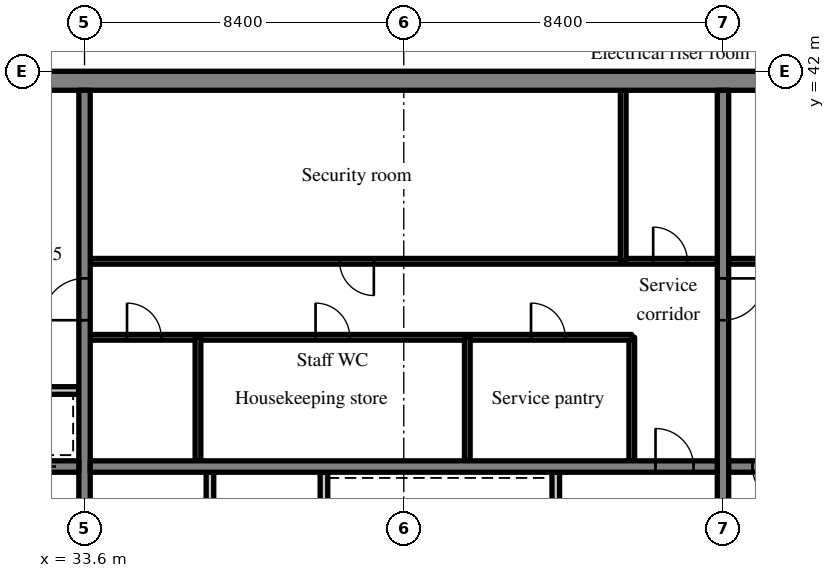
"""IFC4 building model, lengths in metres.
Left out: names, types, materials, properties, quantities, classifications, styles, units other than length and angle.
Written with IfcOpenShell. Run it as: python <this file> out.ifc"""

import sys

from ifc_helpers import new_model, si_unit, direction, frame, frame_2d, origin, place, context, subcontext, project, spatial, rectangle, extrude, source, transform, mapped, element, fill, save


model = new_model("IFC4")
c1 = context("Model", 3, precision=1e-05, world=origin(), true_north=direction((0.0, 1.0)))
c2 = subcontext(c1, "Body", "Model", "MODEL_VIEW")
j1 = project(units=[si_unit("LENGTHUNIT", "METRE"), si_unit("PLANEANGLEUNIT", "RADIAN")], contexts=[c1])
p1 = place(None, origin())
s1 = spatial("IfcSite", under=j1, at=p1, CompositionType="ELEMENT")
p2 = place(p1, origin())
s2 = spatial("IfcBuilding", under=s1, at=p2, CompositionType="ELEMENT")
p3 = place(p2, frame((0.0, 0.0, 313.7)))
s3 = spatial("IfcBuildingStorey", under=s2, at=p3, CompositionType="ELEMENT", Elevation=313.7)
m1 = source(origin(), c2, "Body", "SweptSolid", [
    extrude(rectangle(XDim=50.4, YDim=0.5, at=frame_2d((25.2, 0.0))), origin(), (0.0, 0.0, 1.0), 3.72),
])
p4 = place(p3, frame((25.2, 41.75, 0.0), z_axis=(0.0, 0.0, 1.0), x_axis=(1.0, 0.0, 0.0)))
e1 = element("IfcWall", 1, at=p4, inside=s3, PredefinedType="SHEAR", context=c2, shape_type="MappedRepresentation", body=[
    mapped(m1, transform((0.0, 0.0, 0.0), scale=1.0)),
])
m2 = source(origin(), c2, "Body", "SweptSolid", [
    extrude(rectangle(XDim=19.0, YDim=0.3, at=frame_2d((9.5, 0.0))), origin(), (0.0, 0.0, 1.0), 3.72),
])
p5 = place(p3, frame((33.6, 22.5, 0.0), z_axis=(0.0, 0.0, 1.0), x_axis=(0.0, 1.0, 0.0)))
e2 = element("IfcWall", 2, at=p5, inside=s3, PredefinedType="SHEAR", context=c2, shape_type="MappedRepresentation", body=[
    mapped(m2, transform((0.0, 0.0, 0.0), scale=1.0)),
])
m3 = source(origin(), c2, "Body", "SweptSolid", [
    extrude(rectangle(XDim=1.1, YDim=2.1, at=frame_2d((0.55, 1.05))), frame((0.0, 0.16, 0.0), z_axis=(0.0, -1.0, 0.0), x_axis=(1.0, 0.0, 0.0)), (0.0, 0.0, 1.0), 0.32),
])
p6 = place(p5, frame((12.95, 0.0, 0.0)))
e3 = element("IfcOpeningElement", 3, at=p6, cuts=e2, PredefinedType="OPENING", context=c2, shape_type="MappedRepresentation", body=[
    mapped(m3, transform((0.0, 0.0, 0.0), scale=1.0)),
])
p7 = place(p3, frame((50.4, 22.5, 0.0), z_axis=(0.0, 0.0, 1.0), x_axis=(0.0, 1.0, 0.0)))
e4 = element("IfcWall", 4, at=p7, inside=s3, PredefinedType="SHEAR", context=c2, shape_type="MappedRepresentation", body=[
    mapped(m2, transform((0.0, 0.0, 0.0), scale=1.0)),
])
p8 = place(p7, frame((12.95, 0.0, 0.0)))
e5 = element("IfcOpeningElement", 5, at=p8, cuts=e4, PredefinedType="OPENING", context=c2, shape_type="MappedRepresentation", body=[
    mapped(m3, transform((0.0, 0.0, 0.0), scale=1.0)),
])
m4 = source(origin(), c2, "Body", "SweptSolid", [
    extrude(rectangle(XDim=7.75, YDim=0.3, at=frame_2d((3.875, 0.0))), origin(), (0.0, 0.0, 1.0), 3.72),
])
p9 = place(p3, frame((25.7, 31.6, 0.0), z_axis=(0.0, 0.0, 1.0), x_axis=(1.0, 0.0, 0.0)))
e6 = element("IfcWall", 6, at=p9, inside=s3, PredefinedType="SHEAR", context=c2, shape_type="MappedRepresentation", body=[
    mapped(m4, transform((0.0, 0.0, 0.0), scale=1.0)),
])
p10 = place(p9, frame((6.05, 0.0, 0.0)))
e7 = element("IfcOpeningElement", 7, at=p10, cuts=e6, PredefinedType="OPENING", context=c2, shape_type="MappedRepresentation", body=[
    mapped(m3, transform((0.0, 0.0, 0.0), scale=1.0)),
])
m5 = source(origin(), c2, "Body", "SweptSolid", [
    extrude(rectangle(XDim=16.5, YDim=0.3, at=frame_2d((8.25, 0.0))), origin(), (0.0, 0.0, 1.0), 3.72),
])
p11 = place(p3, frame((33.75, 31.6, 0.0), z_axis=(0.0, 0.0, 1.0), x_axis=(1.0, 0.0, 0.0)))
e8 = element("IfcWall", 8, at=p11, inside=s3, PredefinedType="SHEAR", context=c2, shape_type="MappedRepresentation", body=[
    mapped(m5, transform((0.0, 0.0, 0.0), scale=1.0)),
])
m6 = source(origin(), c2, "Body", "SweptSolid", [
    extrude(rectangle(XDim=1.0, YDim=2.1, at=frame_2d((0.5, 1.05))), frame((0.0, 0.16, 0.0), z_axis=(0.0, -1.0, 0.0), x_axis=(1.0, 0.0, 0.0)), (0.0, 0.0, 1.0), 0.32),
])
p12 = place(p11, frame((14.875, 0.0, 0.0)))
e9 = element("IfcOpeningElement", 9, at=p12, cuts=e8, PredefinedType="OPENING", context=c2, shape_type="MappedRepresentation", body=[
    mapped(m6, transform((0.0, 0.0, 0.0), scale=1.0)),
])
p13 = place(p3, frame((50.55, 31.6, 0.0), z_axis=(0.0, 0.0, 1.0), x_axis=(1.0, 0.0, 0.0)))
e10 = element("IfcWall", 10, at=p13, inside=s3, PredefinedType="SHEAR", context=c2, shape_type="MappedRepresentation", body=[
    mapped(m5, transform((0.0, 0.0, 0.0), scale=1.0)),
])
p14 = place(p13, frame((0.625, 0.0, 0.0)))
e11 = element("IfcOpeningElement", 11, at=p14, cuts=e10, PredefinedType="OPENING", context=c2, shape_type="MappedRepresentation", body=[
    mapped(m6, transform((0.0, 0.0, 0.0), scale=1.0)),
])
m7 = source(origin(), c2, "Body", "SweptSolid", [
    extrude(rectangle(XDim=8.95, YDim=0.2, at=frame_2d((4.475, 0.0))), origin(), (0.0, 0.0, 1.0), 3.72),
])
p15 = place(p3, frame((39.9, 22.5, 0.0), z_axis=(0.0, 0.0, 1.0), x_axis=(0.0, 1.0, 0.0)))
e12 = element("IfcWall", 12, at=p15, inside=s3, PredefinedType="PARTITIONING", context=c2, shape_type="MappedRepresentation", body=[
    mapped(m7, transform((0.0, 0.0, 0.0), scale=1.0)),
])
m8 = source(origin(), c2, "Body", "SweptSolid", [
    extrude(rectangle(XDim=0.9, YDim=2.1, at=frame_2d((0.45, 1.05))), frame((0.0, 0.11, 0.0), z_axis=(0.0, -1.0, 0.0), x_axis=(1.0, 0.0, 0.0)), (0.0, 0.0, 1.0), 0.22),
])
p16 = place(p15, frame((3.25, 0.0, 0.0)))
e13 = element("IfcOpeningElement", 13, at=p16, cuts=e12, PredefinedType="OPENING", context=c2, shape_type="MappedRepresentation", body=[
    mapped(m8, transform((0.0, 0.0, 0.0), scale=1.0)),
])
p17 = place(p15, frame((5.05, 0.0, 0.0)))
e14 = element("IfcOpeningElement", 14, at=p17, cuts=e12, PredefinedType="OPENING", context=c2, shape_type="MappedRepresentation", body=[
    mapped(m8, transform((0.0, 0.0, 0.0), scale=1.0)),
])
m9 = source(origin(), c2, "Body", "SweptSolid", [
    extrude(rectangle(XDim=2.65, YDim=0.2, at=frame_2d((1.325, 0.0))), origin(), (0.0, 0.0, 1.0), 3.72),
])
p18 = place(p3, frame((46.0, 28.8, 0.0), z_axis=(0.0, 0.0, 1.0), x_axis=(0.0, 1.0, 0.0)))
e15 = element("IfcWall", 15, at=p18, inside=s3, PredefinedType="SOLIDWALL", context=c2, shape_type="MappedRepresentation", body=[
    mapped(m9, transform((0.0, 0.0, 0.0), scale=1.0)),
])
p19 = place(p3, frame((36.9, 22.5, 0.0), z_axis=(0.0, 0.0, 1.0), x_axis=(0.0, 1.0, 0.0)))
e16 = element("IfcWall", 16, at=p19, inside=s3, PredefinedType="PARTITIONING", context=c2, shape_type="MappedRepresentation", body=[
    mapped(m7, transform((0.0, 0.0, 0.0), scale=1.0)),
])
m10 = source(origin(), c2, "Body", "SweptSolid", [
    extrude(rectangle(XDim=3.25, YDim=0.15, at=frame_2d((1.625, 0.0))), origin(), (0.0, 0.0, 1.0), 3.72),
])
p20 = place(p3, frame((48.0, 31.75, 0.0), z_axis=(0.0, 0.0, 1.0), x_axis=(0.0, 1.0, 0.0)))
e17 = element("IfcWall", 17, at=p20, inside=s3, PredefinedType="PARTITIONING", context=c2, shape_type="MappedRepresentation", body=[
    mapped(m10, transform((0.0, 0.0, 0.0), scale=1.0)),
])
m11 = source(origin(), c2, "Body", "SweptSolid", [
    extrude(rectangle(XDim=14.25, YDim=0.15, at=frame_2d((7.125, 0.0))), origin(), (0.0, 0.0, 1.0), 3.72),
])
p21 = place(p3, frame((33.75, 35.0, 0.0), z_axis=(0.0, 0.0, 1.0), x_axis=(1.0, 0.0, 0.0)))
e18 = element("IfcWall", 18, at=p21, inside=s3, PredefinedType="PARTITIONING", context=c2, shape_type="MappedRepresentation", body=[
    mapped(m11, transform((0.0, 0.0, 0.0), scale=1.0)),
])
m12 = source(origin(), c2, "Body", "SweptSolid", [
    extrude(rectangle(XDim=0.9, YDim=2.1, at=frame_2d((0.45, 1.05))), frame((0.0, 0.085, 0.0), z_axis=(0.0, -1.0, 0.0), x_axis=(1.0, 0.0, 0.0)), (0.0, 0.0, 1.0), 0.17),
])
p22 = place(p21, frame((0.968, 0.0, 0.0)))
e19 = element("IfcOpeningElement", 19, at=p22, cuts=e18, PredefinedType="OPENING", context=c2, shape_type="MappedRepresentation", body=[
    mapped(m12, transform((0.0, 0.0, 0.0), scale=1.0)),
])
p23 = place(p21, frame((5.929, 0.0, 0.0)))
e20 = element("IfcOpeningElement", 20, at=p23, cuts=e18, PredefinedType="OPENING", context=c2, shape_type="MappedRepresentation", body=[
    mapped(m12, transform((0.0, 0.0, 0.0), scale=1.0)),
])
p24 = place(p21, frame((11.599, 0.0, 0.0)))
e21 = element("IfcOpeningElement", 21, at=p24, cuts=e18, PredefinedType="OPENING", context=c2, shape_type="MappedRepresentation", body=[
    mapped(m12, transform((0.0, 0.0, 0.0), scale=1.0)),
])
m13 = source(origin(), c2, "Body", "SweptSolid", [
    extrude(rectangle(XDim=16.5, YDim=0.15, at=frame_2d((8.25, 0.0))), origin(), (0.0, 0.0, 1.0), 3.72),
])
p25 = place(p3, frame((33.75, 37.0, 0.0), z_axis=(0.0, 0.0, 1.0), x_axis=(1.0, 0.0, 0.0)))
e22 = element("IfcWall", 22, at=p25, inside=s3, PredefinedType="PARTITIONING", context=c2, shape_type="MappedRepresentation", body=[
    mapped(m13, transform((0.0, 0.0, 0.0), scale=1.0)),
])
p26 = place(p25, frame((6.563, 0.0, 0.0)))
e23 = element("IfcOpeningElement", 23, at=p26, cuts=e22, PredefinedType="OPENING", context=c2, shape_type="MappedRepresentation", body=[
    mapped(m12, transform((0.0, 0.0, 0.0), scale=1.0)),
])
p27 = place(p25, frame((14.813, 0.0, 0.0)))
e24 = element("IfcOpeningElement", 24, at=p27, cuts=e22, PredefinedType="OPENING", context=c2, shape_type="MappedRepresentation", body=[
    mapped(m12, transform((0.0, 0.0, 0.0), scale=1.0)),
])
for number, where, z_axis, x_axis in (
    (25, (36.585, 31.75, 0.0), (0.0, 0.0, 1.0), (0.0, 1.0, 0.0)),
    (26, (43.672, 31.75, 0.0), (0.0, 0.0, 1.0), (0.0, 1.0, 0.0)),
):
    element("IfcWall", number, at=place(p3, frame(where, z_axis=z_axis, x_axis=x_axis)), inside=s3, PredefinedType="PARTITIONING", context=c2, shape_type="MappedRepresentation", body=[
        mapped(m10, transform((0.0, 0.0, 0.0), scale=1.0)),
    ])
m14 = source(origin(), c2, "Body", "SweptSolid", [
    extrude(rectangle(XDim=4.5, YDim=0.15, at=frame_2d((2.25, 0.0))), origin(), (0.0, 0.0, 1.0), 3.72),
])
p28 = place(p3, frame((47.775, 37.0, 0.0), z_axis=(0.0, 0.0, 1.0), x_axis=(0.0, 1.0, 0.0)))
e27 = element("IfcWall", 27, at=p28, inside=s3, PredefinedType="PARTITIONING", context=c2, shape_type="MappedRepresentation", body=[
    mapped(m14, transform((0.0, 0.0, 0.0), scale=1.0)),
])
p29 = place(p3, frame((67.05, 37.0, 0.0), z_axis=(0.0, 0.0, 1.0), x_axis=(-1.0, 0.0, 0.0)))
e28 = element("IfcWall", 28, at=p29, inside=s3, PredefinedType="PARTITIONING", context=c2, shape_type="MappedRepresentation", body=[
    mapped(m13, transform((0.0, 0.0, 0.0), scale=1.0)),
])
p30 = place(p29, frame((1.613, 0.0, 0.0)))
e29 = element("IfcOpeningElement", 29, at=p30, cuts=e28, PredefinedType="OPENING", context=c2, shape_type="MappedRepresentation", body=[
    mapped(m12, transform((0.0, 0.0, 0.0), scale=1.0)),
])
p31 = place(p29, frame((7.388, 0.0, 0.0)))
e30 = element("IfcOpeningElement", 30, at=p31, cuts=e28, PredefinedType="OPENING", context=c2, shape_type="MappedRepresentation", body=[
    mapped(m12, transform((0.0, 0.0, 0.0), scale=1.0)),
])
p32 = place(p29, frame((12.337, 0.0, 0.0)))
e31 = element("IfcOpeningElement", 31, at=p32, cuts=e28, PredefinedType="OPENING", context=c2, shape_type="MappedRepresentation", body=[
    mapped(m12, transform((0.0, 0.0, 0.0), scale=1.0)),
])
p33 = place(p29, frame((14.813, 0.0, 0.0)))
e32 = element("IfcOpeningElement", 32, at=p33, cuts=e28, PredefinedType="OPENING", context=c2, shape_type="MappedRepresentation", body=[
    mapped(m12, transform((0.0, 0.0, 0.0), scale=1.0)),
])
m15 = source(origin(), c2, "Body", "SweptSolid", [
    extrude(rectangle(XDim=2.3, YDim=0.2, at=frame_2d((1.15, 0.0))), origin(), (0.0, 0.0, 1.0), 3.72),
])
p34 = place(p3, frame((31.15, 33.6, 0.0), z_axis=(0.0, 0.0, 1.0), x_axis=(1.0, 0.0, 0.0)))
e33 = element("IfcWall", 33, at=p34, inside=s3, PredefinedType="SOLIDWALL", context=c2, shape_type="MappedRepresentation", body=[
    mapped(m15, transform((0.0, 0.0, 0.0), scale=1.0)),
])
m16 = source(origin(), c2, "Body", "SweptSolid", [
    extrude(rectangle(XDim=1.0, YDim=2.1, at=frame_2d((0.5, 1.05))), frame((0.0, 0.025, 0.0), z_axis=(0.0, -1.0, 0.0), x_axis=(1.0, 0.0, 0.0)), (0.0, 0.0, 1.0), 0.05),
])
p35 = place(p12, origin())
e34 = element("IfcDoor", 34, at=p35, inside=s3, OperationType="SINGLE_SWING_LEFT", PredefinedType="DOOR", context=c2, shape_type="MappedRepresentation", body=[
    mapped(m16, transform((0.0, 0.0, 0.0), scale=1.0)),
])
fill(e9, e34)
m17 = source(origin(), c2, "Body", "SweptSolid", [
    extrude(rectangle(XDim=0.9, YDim=2.1, at=frame_2d((0.45, 1.05))), frame((0.0, 0.025, 0.0), z_axis=(0.0, -1.0, 0.0), x_axis=(1.0, 0.0, 0.0)), (0.0, 0.0, 1.0), 0.05),
])
p36 = place(p22, origin())
e35 = element("IfcDoor", 35, at=p36, inside=s3, OperationType="SINGLE_SWING_LEFT", PredefinedType="DOOR", context=c2, shape_type="MappedRepresentation", body=[
    mapped(m17, transform((0.0, 0.0, 0.0), scale=1.0)),
])
fill(e19, e35)
p37 = place(p23, origin())
e36 = element("IfcDoor", 36, at=p37, inside=s3, OperationType="SINGLE_SWING_LEFT", PredefinedType="DOOR", context=c2, shape_type="MappedRepresentation", body=[
    mapped(m17, transform((0.0, 0.0, 0.0), scale=1.0)),
])
fill(e20, e36)
p38 = place(p24, origin())
e37 = element("IfcDoor", 37, at=p38, inside=s3, OperationType="SINGLE_SWING_LEFT", PredefinedType="DOOR", context=c2, shape_type="MappedRepresentation", body=[
    mapped(m17, transform((0.0, 0.0, 0.0), scale=1.0)),
])
fill(e21, e37)
p39 = place(p26, origin())
e38 = element("IfcDoor", 38, at=p39, inside=s3, OperationType="SINGLE_SWING_RIGHT", PredefinedType="DOOR", context=c2, shape_type="MappedRepresentation", body=[
    mapped(m17, transform((0.0, 0.0, 0.0), scale=1.0)),
])
fill(e23, e38)
p40 = place(p27, origin())
e39 = element("IfcDoor", 39, at=p40, inside=s3, OperationType="SINGLE_SWING_LEFT", PredefinedType="DOOR", context=c2, shape_type="MappedRepresentation", body=[
    mapped(m17, transform((0.0, 0.0, 0.0), scale=1.0)),
])
fill(e24, e39)
p41 = place(p14, origin())
e40 = element("IfcDoor", 40, at=p41, inside=s3, OperationType="SINGLE_SWING_RIGHT", PredefinedType="DOOR", context=c2, shape_type="MappedRepresentation", body=[
    mapped(m16, transform((0.0, 0.0, 0.0), scale=1.0)),
])
fill(e11, e40)
m18 = source(origin(), c2, "Body", "SweptSolid", [
    extrude(rectangle(XDim=1.1, YDim=2.1, at=frame_2d((0.55, 1.05))), frame((0.0, 0.025, 0.0), z_axis=(0.0, -1.0, 0.0), x_axis=(1.0, 0.0, 0.0)), (0.0, 0.0, 1.0), 0.05),
])
p42 = place(p10, origin())
e41 = element("IfcDoor", 41, at=p42, inside=s3, OperationType="SLIDING_TO_RIGHT", PredefinedType="DOOR", context=c2, shape_type="MappedRepresentation", body=[
    mapped(m18, transform((0.0, 0.0, 0.0), scale=1.0)),
])
fill(e7, e41)
p43 = place(p6, origin())
e42 = element("IfcDoor", 42, at=p43, inside=s3, OperationType="SINGLE_SWING_LEFT", PredefinedType="DOOR", context=c2, shape_type="MappedRepresentation", body=[
    mapped(m18, transform((0.0, 0.0, 0.0), scale=1.0)),
])
fill(e3, e42)
p44 = place(p8, origin())
e43 = element("IfcDoor", 43, at=p44, inside=s3, OperationType="SINGLE_SWING_RIGHT", PredefinedType="DOOR", context=c2, shape_type="MappedRepresentation", body=[
    mapped(m18, transform((0.0, 0.0, 0.0), scale=1.0)),
])
fill(e5, e43)
save(model, sys.argv[1])
